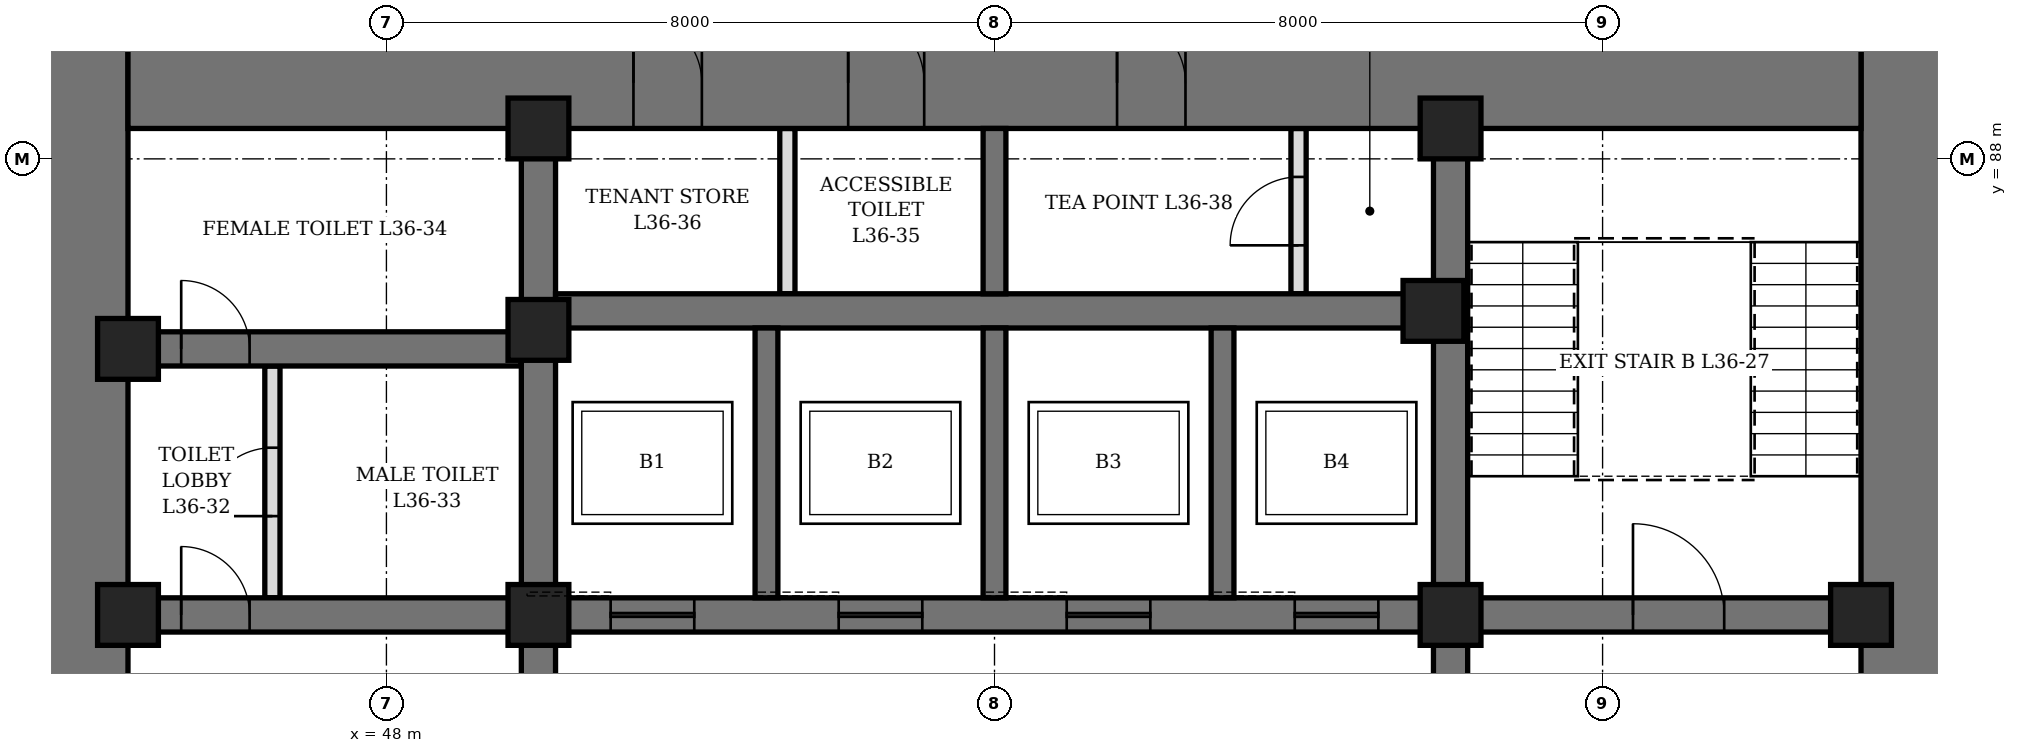
"""IFC4 building model, lengths in metres.
Left out: names, types, materials, properties, quantities, classifications, styles, units other than length and angle.
Written with IfcOpenShell. Run it as: python <this file> out.ifc"""

import sys

from ifc_helpers import new_model, si_unit, direction, frame, frame_2d, origin, origin_2d, place, context, subcontext, project, spatial, rectangle, hollow_rectangle, extrude, element, fill, save


model = new_model("IFC4")
c1 = context("Model", 3, precision=1e-05, world=origin(), true_north=direction((0.0, 1.0)))
c2 = subcontext(c1, "Body", "Model", "MODEL_VIEW")
j1 = project(units=[si_unit("LENGTHUNIT", "METRE"), si_unit("PLANEANGLEUNIT", "RADIAN")], contexts=[c1])
p1 = place(None, origin())
s1 = spatial("IfcSite", under=j1, at=p1, CompositionType="ELEMENT")
p2 = place(p1, origin())
s2 = spatial("IfcBuilding", under=s1, at=p2, CompositionType="ELEMENT")
p3 = place(p2, frame((0.0, 0.0, 162.7)))
s3 = spatial("IfcBuildingStorey", under=s2, at=p3, CompositionType="ELEMENT", Elevation=162.7)
p4 = place(p3, frame((44.0, 70.4, 0.0), z_axis=(0.0, 0.0, 1.0), x_axis=(0.0, 1.0, 0.0)))
e1 = element("IfcWall", 1, at=p4, inside=s3, PredefinedType="SHEAR", context=c2, shape_type="SweptSolid", body=[
    extrude(rectangle(XDim=19.2, YDim=1.2, at=frame_2d((9.6, 0.0))), origin(), (0.0, 0.0, 1.0), 4.2),
])
p5 = place(p4, frame((8.6, 0.0, 0.0)))
e2 = element("IfcOpeningElement", 2, at=p5, cuts=e1, PredefinedType="OPENING", context=c2, shape_type="SweptSolid", body=[
    extrude(rectangle(XDim=2.0, YDim=2.4, at=frame_2d((1.0, 1.2))), frame((0.0, 0.61, 0.0), z_axis=(0.0, -1.0, 0.0), x_axis=(1.0, 0.0, 0.0)), (0.0, 0.0, 1.0), 1.22),
])
p6 = place(p3, frame((68.0, 70.4, 0.0), z_axis=(0.0, 0.0, 1.0), x_axis=(0.0, 1.0, 0.0)))
e3 = element("IfcWall", 3, at=p6, inside=s3, PredefinedType="SHEAR", context=c2, shape_type="SweptSolid", body=[
    extrude(rectangle(XDim=19.2, YDim=1.2, at=frame_2d((9.6, 0.0))), origin(), (0.0, 0.0, 1.0), 4.2),
])
p7 = place(p6, frame((8.6, 0.0, 0.0)))
e4 = element("IfcOpeningElement", 4, at=p7, cuts=e3, PredefinedType="OPENING", context=c2, shape_type="SweptSolid", body=[
    extrude(rectangle(XDim=2.0, YDim=2.4, at=frame_2d((1.0, 1.2))), frame((0.0, 0.61, 0.0), z_axis=(0.0, -1.0, 0.0), x_axis=(1.0, 0.0, 0.0)), (0.0, 0.0, 1.0), 1.22),
])
p8 = place(p3, frame((44.6, 89.0, 0.0), z_axis=(0.0, 0.0, 1.0), x_axis=(1.0, 0.0, 0.0)))
e5 = element("IfcWall", 5, at=p8, inside=s3, PredefinedType="SHEAR", context=c2, shape_type="SweptSolid", body=[
    extrude(rectangle(XDim=22.8, YDim=1.2, at=frame_2d((11.4, 0.0))), origin(), (0.0, 0.0, 1.0), 4.2),
])
p9 = place(p8, frame((9.475, 0.0, 0.0)))
e6 = element("IfcOpeningElement", 6, at=p9, cuts=e5, PredefinedType="OPENING", context=c2, shape_type="SweptSolid", body=[
    extrude(rectangle(XDim=1.0, YDim=2.1, at=frame_2d((0.5, 1.05))), frame((0.0, 0.61, 0.0), z_axis=(0.0, -1.0, 0.0), x_axis=(1.0, 0.0, 0.0)), (0.0, 0.0, 1.0), 1.22),
])
p10 = place(p8, frame((6.65, 0.0, 0.0)))
e7 = element("IfcOpeningElement", 7, at=p10, cuts=e5, PredefinedType="OPENING", context=c2, shape_type="SweptSolid", body=[
    extrude(rectangle(XDim=0.9, YDim=2.1, at=frame_2d((0.45, 1.05))), frame((0.0, 0.61, 0.0), z_axis=(0.0, -1.0, 0.0), x_axis=(1.0, 0.0, 0.0)), (0.0, 0.0, 1.0), 1.22),
])
p11 = place(p8, frame((13.012, 0.0, 0.0)))
e8 = element("IfcOpeningElement", 8, at=p11, cuts=e5, PredefinedType="OPENING", context=c2, shape_type="SweptSolid", body=[
    extrude(rectangle(XDim=0.9, YDim=2.1, at=frame_2d((0.45, 1.05))), frame((0.0, 0.61, 0.0), z_axis=(0.0, -1.0, 0.0), x_axis=(1.0, 0.0, 0.0)), (0.0, 0.0, 1.0), 1.22),
])
p12 = place(p3, frame((50.0, 71.6, 0.0), z_axis=(0.0, 0.0, 1.0), x_axis=(0.0, 1.0, 0.0)))
e9 = element("IfcWall", 9, at=p12, inside=s3, PredefinedType="SHEAR", context=c2, shape_type="SweptSolid", body=[
    extrude(rectangle(XDim=16.8, YDim=0.45, at=frame_2d((8.4, 0.0))), origin(), (0.0, 0.0, 1.0), 4.2),
])
p13 = place(p12, frame((7.5, 0.0, 0.0)))
e10 = element("IfcOpeningElement", 10, at=p13, cuts=e9, PredefinedType="OPENING", context=c2, shape_type="SweptSolid", body=[
    extrude(rectangle(XDim=1.8, YDim=2.4, at=frame_2d((0.9, 1.2))), frame((0.0, 0.235, 0.0), z_axis=(0.0, -1.0, 0.0), x_axis=(1.0, 0.0, 0.0)), (0.0, 0.0, 1.0), 0.47),
])
p14 = place(p3, frame((62.0, 71.6, 0.0), z_axis=(0.0, 0.0, 1.0), x_axis=(0.0, 1.0, 0.0)))
e11 = element("IfcWall", 11, at=p14, inside=s3, PredefinedType="SHEAR", context=c2, shape_type="SweptSolid", body=[
    extrude(rectangle(XDim=16.8, YDim=0.45, at=frame_2d((8.4, 0.0))), origin(), (0.0, 0.0, 1.0), 4.2),
])
p15 = place(p14, frame((7.5, 0.0, 0.0)))
e12 = element("IfcOpeningElement", 12, at=p15, cuts=e11, PredefinedType="OPENING", context=c2, shape_type="SweptSolid", body=[
    extrude(rectangle(XDim=1.8, YDim=2.4, at=frame_2d((0.9, 1.2))), frame((0.0, 0.235, 0.0), z_axis=(0.0, -1.0, 0.0), x_axis=(1.0, 0.0, 0.0)), (0.0, 0.0, 1.0), 0.47),
])
p16 = place(p3, frame((44.6, 82.0, 0.0), z_axis=(0.0, 0.0, 1.0), x_axis=(1.0, 0.0, 0.0)))
e13 = element("IfcWall", 13, at=p16, inside=s3, PredefinedType="SHEAR", context=c2, shape_type="SweptSolid", body=[
    extrude(rectangle(XDim=5.175, YDim=0.45, at=frame_2d((2.587, 0.0))), origin(), (0.0, 0.0, 1.0), 4.2),
])
p17 = place(p16, frame((0.7, 0.0, 0.0)))
e14 = element("IfcOpeningElement", 14, at=p17, cuts=e13, PredefinedType="OPENING", context=c2, shape_type="SweptSolid", body=[
    extrude(rectangle(XDim=0.9, YDim=2.1, at=frame_2d((0.45, 1.05))), frame((0.0, 0.235, 0.0), z_axis=(0.0, -1.0, 0.0), x_axis=(1.0, 0.0, 0.0)), (0.0, 0.0, 1.0), 0.47),
])
p18 = place(p3, frame((44.6, 85.5, 0.0), z_axis=(0.0, 0.0, 1.0), x_axis=(1.0, 0.0, 0.0)))
e15 = element("IfcWall", 15, at=p18, inside=s3, PredefinedType="SHEAR", context=c2, shape_type="SweptSolid", body=[
    extrude(rectangle(XDim=5.175, YDim=0.45, at=frame_2d((2.587, 0.0))), origin(), (0.0, 0.0, 1.0), 4.2),
])
p19 = place(p18, frame((0.7, 0.0, 0.0)))
e16 = element("IfcOpeningElement", 16, at=p19, cuts=e15, PredefinedType="OPENING", context=c2, shape_type="SweptSolid", body=[
    extrude(rectangle(XDim=0.9, YDim=2.1, at=frame_2d((0.45, 1.05))), frame((0.0, 0.235, 0.0), z_axis=(0.0, -1.0, 0.0), x_axis=(1.0, 0.0, 0.0)), (0.0, 0.0, 1.0), 0.47),
])
p20 = place(p3, frame((62.225, 82.0, 0.0), z_axis=(0.0, 0.0, 1.0), x_axis=(1.0, 0.0, 0.0)))
e17 = element("IfcWall", 17, at=p20, inside=s3, PredefinedType="SHEAR", context=c2, shape_type="SweptSolid", body=[
    extrude(rectangle(XDim=5.175, YDim=0.45, at=frame_2d((2.587, 0.0))), origin(), (0.0, 0.0, 1.0), 4.2),
])
p21 = place(p20, frame((2.175, 0.0, 0.0)))
e18 = element("IfcOpeningElement", 18, at=p21, cuts=e17, PredefinedType="OPENING", context=c2, shape_type="SweptSolid", body=[
    extrude(rectangle(XDim=1.2, YDim=2.1, at=frame_2d((0.6, 1.05))), frame((0.0, 0.235, 0.0), z_axis=(0.0, -1.0, 0.0), x_axis=(1.0, 0.0, 0.0)), (0.0, 0.0, 1.0), 0.47),
])
p22 = place(p3, frame((50.225, 82.0, 0.0), z_axis=(0.0, 0.0, 1.0), x_axis=(1.0, 0.0, 0.0)))
e19 = element("IfcWall", 19, at=p22, inside=s3, PredefinedType="SHEAR", context=c2, shape_type="SweptSolid", body=[
    extrude(rectangle(XDim=11.55, YDim=0.45, at=frame_2d((5.775, 0.0))), origin(), (0.0, 0.0, 1.0), 4.2),
])
p23 = place(p22, frame((0.725, 0.0, 0.0)))
e20 = element("IfcOpeningElement", 20, at=p23, cuts=e19, PredefinedType="OPENING", context=c2, shape_type="SweptSolid", body=[
    extrude(rectangle(XDim=1.1, YDim=2.2, at=frame_2d((0.55, 1.1))), frame((0.0, 0.235, 0.0), z_axis=(0.0, -1.0, 0.0), x_axis=(1.0, 0.0, 0.0)), (0.0, 0.0, 1.0), 0.47),
])
p24 = place(p22, frame((3.725, 0.0, 0.0)))
e21 = element("IfcOpeningElement", 21, at=p24, cuts=e19, PredefinedType="OPENING", context=c2, shape_type="SweptSolid", body=[
    extrude(rectangle(XDim=1.1, YDim=2.2, at=frame_2d((0.55, 1.1))), frame((0.0, 0.235, 0.0), z_axis=(0.0, -1.0, 0.0), x_axis=(1.0, 0.0, 0.0)), (0.0, 0.0, 1.0), 0.47),
])
p25 = place(p22, frame((6.725, 0.0, 0.0)))
e22 = element("IfcOpeningElement", 22, at=p25, cuts=e19, PredefinedType="OPENING", context=c2, shape_type="SweptSolid", body=[
    extrude(rectangle(XDim=1.1, YDim=2.2, at=frame_2d((0.55, 1.1))), frame((0.0, 0.235, 0.0), z_axis=(0.0, -1.0, 0.0), x_axis=(1.0, 0.0, 0.0)), (0.0, 0.0, 1.0), 0.47),
])
p26 = place(p22, frame((9.725, 0.0, 0.0)))
e23 = element("IfcOpeningElement", 23, at=p26, cuts=e19, PredefinedType="OPENING", context=c2, shape_type="SweptSolid", body=[
    extrude(rectangle(XDim=1.1, YDim=2.2, at=frame_2d((0.55, 1.1))), frame((0.0, 0.235, 0.0), z_axis=(0.0, -1.0, 0.0), x_axis=(1.0, 0.0, 0.0)), (0.0, 0.0, 1.0), 0.47),
])
p27 = place(p3, frame((50.225, 86.0, 0.0), z_axis=(0.0, 0.0, 1.0), x_axis=(1.0, 0.0, 0.0)))
e24 = element("IfcWall", 24, at=p27, inside=s3, PredefinedType="SHEAR", context=c2, shape_type="SweptSolid", body=[
    extrude(rectangle(XDim=11.55, YDim=0.45, at=frame_2d((5.775, 0.0))), origin(), (0.0, 0.0, 1.0), 4.2),
])
for number, where, z_axis, x_axis in (
    (25, (53.0, 82.225, 0.0), (0.0, 0.0, 1.0), (0.0, 1.0, 0.0)),
    (26, (56.0, 82.225, 0.0), (0.0, 0.0, 1.0), (0.0, 1.0, 0.0)),
    (27, (59.0, 82.225, 0.0), (0.0, 0.0, 1.0), (0.0, 1.0, 0.0)),
):
    element("IfcWall", number, at=place(p3, frame(where, z_axis=z_axis, x_axis=x_axis)), inside=s3, PredefinedType="SHEAR", context=c2, shape_type="SweptSolid", body=[
        extrude(rectangle(XDim=3.55, YDim=0.3, at=frame_2d((1.775, 0.0))), origin(), (0.0, 0.0, 1.0), 4.2),
    ])
p28 = place(p3, frame((56.0, 86.225, 0.0), z_axis=(0.0, 0.0, 1.0), x_axis=(0.0, 1.0, 0.0)))
e28 = element("IfcWall", 28, at=p28, inside=s3, PredefinedType="SHEAR", context=c2, shape_type="SweptSolid", body=[
    extrude(rectangle(XDim=2.175, YDim=0.3, at=frame_2d((1.087, 0.0))), origin(), (0.0, 0.0, 1.0), 4.2),
])
for number, where, z_axis, x_axis in (
    (29, (44.6, 82.0, 0.0), (0.0, 0.0, 1.0), (1.0, 0.0, 0.0)),
    (30, (44.6, 85.5, 0.0), (0.0, 0.0, 1.0), (1.0, 0.0, 0.0)),
    (31, (50.0, 82.0, 0.0), (0.0, 0.0, 1.0), (1.0, 0.0, 0.0)),
    (32, (50.0, 85.75, 0.0), (0.0, 0.0, 1.0), (1.0, 0.0, 0.0)),
    (33, (50.0, 88.4, 0.0), (0.0, 0.0, 1.0), (1.0, 0.0, 0.0)),
    (34, (61.775, 86.0, 0.0), (0.0, 0.0, 1.0), (1.0, 0.0, 0.0)),
    (35, (62.0, 82.0, 0.0), (0.0, 0.0, 1.0), (1.0, 0.0, 0.0)),
    (36, (62.0, 88.4, 0.0), (0.0, 0.0, 1.0), (1.0, 0.0, 0.0)),
    (37, (67.4, 82.0, 0.0), (0.0, 0.0, 1.0), (1.0, 0.0, 0.0)),
):
    element("IfcColumn", number, at=place(p3, frame(where, z_axis=z_axis, x_axis=x_axis)), inside=s3, PredefinedType="COLUMN", context=c2, shape_type="SweptSolid", body=[
        extrude(hollow_rectangle(XDim=0.8, YDim=0.8, WallThickness=0.1, at=origin_2d()), origin(), (0.0, 0.0, 1.0), 4.2),
    ])
p29 = place(p3, frame((46.5, 82.225, 0.0), z_axis=(0.0, 0.0, 1.0), x_axis=(0.0, 1.0, 0.0)))
e38 = element("IfcWall", 38, at=p29, inside=s3, PredefinedType="PARTITIONING", context=c2, shape_type="SweptSolid", body=[
    extrude(rectangle(XDim=3.05, YDim=0.2, at=frame_2d((1.525, 0.0))), origin(), (0.0, 0.0, 1.0), 4.04),
])
p30 = place(p29, frame((1.075, 0.0, 0.0)))
e39 = element("IfcOpeningElement", 39, at=p30, cuts=e38, PredefinedType="OPENING", context=c2, shape_type="SweptSolid", body=[
    extrude(rectangle(XDim=0.9, YDim=2.1, at=frame_2d((0.45, 1.05))), frame((0.0, 0.11, 0.0), z_axis=(0.0, -1.0, 0.0), x_axis=(1.0, 0.0, 0.0)), (0.0, 0.0, 1.0), 0.22),
])
p31 = place(p3, frame((53.275, 86.225, 0.0), z_axis=(0.0, 0.0, 1.0), x_axis=(0.0, 1.0, 0.0)))
e40 = element("IfcWall", 40, at=p31, inside=s3, PredefinedType="PARTITIONING", context=c2, shape_type="SweptSolid", body=[
    extrude(rectangle(XDim=2.175, YDim=0.2, at=frame_2d((1.087, 0.0))), origin(), (0.0, 0.0, 1.0), 4.04),
])
p32 = place(p3, frame((60.0, 86.225, 0.0), z_axis=(0.0, 0.0, 1.0), x_axis=(0.0, 1.0, 0.0)))
e41 = element("IfcWall", 41, at=p32, inside=s3, PredefinedType="PARTITIONING", context=c2, shape_type="SweptSolid", body=[
    extrude(rectangle(XDim=2.175, YDim=0.2, at=frame_2d((1.087, 0.0))), origin(), (0.0, 0.0, 1.0), 4.04),
])
p33 = place(p32, frame((0.637, 0.0, 0.0)))
e42 = element("IfcOpeningElement", 42, at=p33, cuts=e41, PredefinedType="OPENING", context=c2, shape_type="SweptSolid", body=[
    extrude(rectangle(XDim=0.9, YDim=2.1, at=frame_2d((0.45, 1.05))), frame((0.0, 0.11, 0.0), z_axis=(0.0, -1.0, 0.0), x_axis=(1.0, 0.0, 0.0)), (0.0, 0.0, 1.0), 0.22),
])
p34 = place(p17, origin())
e43 = element("IfcDoor", 43, at=p34, inside=s3, OperationType="SINGLE_SWING_LEFT", PredefinedType="DOOR", context=c2, shape_type="SweptSolid", body=[
    extrude(rectangle(XDim=0.9, YDim=2.1, at=frame_2d((0.45, 1.05))), frame((0.0, 0.225, 0.0), z_axis=(0.0, -1.0, 0.0), x_axis=(1.0, 0.0, 0.0)), (0.0, 0.0, 1.0), 0.449),
])
fill(e14, e43)
p35 = place(p30, origin())
e44 = element("IfcDoor", 44, at=p35, inside=s3, OperationType="SINGLE_SWING_RIGHT", PredefinedType="DOOR", context=c2, shape_type="SweptSolid", body=[
    extrude(rectangle(XDim=0.9, YDim=2.1, at=frame_2d((0.45, 1.05))), frame((0.0, 0.1, 0.0), z_axis=(0.0, -1.0, 0.0), x_axis=(1.0, 0.0, 0.0)), (0.0, 0.0, 1.0), 0.199),
])
fill(e39, e44)
p36 = place(p19, origin())
e45 = element("IfcDoor", 45, at=p36, inside=s3, OperationType="SINGLE_SWING_RIGHT", PredefinedType="DOOR", context=c2, shape_type="SweptSolid", body=[
    extrude(rectangle(XDim=0.9, YDim=2.1, at=frame_2d((0.45, 1.05))), frame((0.0, 0.225, 0.0), z_axis=(0.0, -1.0, 0.0), x_axis=(1.0, 0.0, 0.0)), (0.0, 0.0, 1.0), 0.449),
])
fill(e16, e45)
p37 = place(p9, origin())
e46 = element("IfcDoor", 46, at=p37, inside=s3, OperationType="SINGLE_SWING_LEFT", PredefinedType="DOOR", context=c2, shape_type="SweptSolid", body=[
    extrude(rectangle(XDim=1.0, YDim=2.1, at=frame_2d((0.5, 1.05))), frame((0.0, 0.35, 0.0), z_axis=(0.0, -1.0, 0.0), x_axis=(1.0, 0.0, 0.0)), (0.0, 0.0, 1.0), 0.7),
])
fill(e6, e46)
p38 = place(p10, origin())
e47 = element("IfcDoor", 47, at=p38, inside=s3, OperationType="SINGLE_SWING_LEFT", PredefinedType="DOOR", context=c2, shape_type="SweptSolid", body=[
    extrude(rectangle(XDim=0.9, YDim=2.1, at=frame_2d((0.45, 1.05))), frame((0.0, 0.35, 0.0), z_axis=(0.0, -1.0, 0.0), x_axis=(1.0, 0.0, 0.0)), (0.0, 0.0, 1.0), 0.7),
])
fill(e7, e47)
p39 = place(p11, origin())
e48 = element("IfcDoor", 48, at=p39, inside=s3, OperationType="SINGLE_SWING_LEFT", PredefinedType="DOOR", context=c2, shape_type="SweptSolid", body=[
    extrude(rectangle(XDim=0.9, YDim=2.1, at=frame_2d((0.45, 1.05))), frame((0.0, 0.35, 0.0), z_axis=(0.0, -1.0, 0.0), x_axis=(1.0, 0.0, 0.0)), (0.0, 0.0, 1.0), 0.7),
])
fill(e8, e48)
p40 = place(p33, origin())
e49 = element("IfcDoor", 49, at=p40, inside=s3, OperationType="SINGLE_SWING_LEFT", PredefinedType="DOOR", context=c2, shape_type="SweptSolid", body=[
    extrude(rectangle(XDim=0.9, YDim=2.1, at=frame_2d((0.45, 1.05))), frame((0.0, 0.1, 0.0), z_axis=(0.0, -1.0, 0.0), x_axis=(1.0, 0.0, 0.0)), (0.0, 0.0, 1.0), 0.199),
])
fill(e42, e49)
p41 = place(p21, origin())
e50 = element("IfcDoor", 50, at=p41, inside=s3, OperationType="SINGLE_SWING_LEFT", PredefinedType="DOOR", context=c2, shape_type="SweptSolid", body=[
    extrude(rectangle(XDim=1.2, YDim=2.1, at=frame_2d((0.6, 1.05))), frame((0.0, 0.225, 0.0), z_axis=(0.0, -1.0, 0.0), x_axis=(1.0, 0.0, 0.0)), (0.0, 0.0, 1.0), 0.449),
])
fill(e18, e50)
p42 = place(p23, origin())
e51 = element("IfcDoor", 51, at=p42, inside=s3, OperationType="SLIDING_TO_LEFT", PredefinedType="DOOR", context=c2, shape_type="SweptSolid", body=[
    extrude(rectangle(XDim=1.1, YDim=2.2, at=frame_2d((0.55, 1.1))), frame((0.0, 0.225, 0.0), z_axis=(0.0, -1.0, 0.0), x_axis=(1.0, 0.0, 0.0)), (0.0, 0.0, 1.0), 0.449),
])
fill(e20, e51)
p43 = place(p24, origin())
e52 = element("IfcDoor", 52, at=p43, inside=s3, OperationType="SLIDING_TO_LEFT", PredefinedType="DOOR", context=c2, shape_type="SweptSolid", body=[
    extrude(rectangle(XDim=1.1, YDim=2.2, at=frame_2d((0.55, 1.1))), frame((0.0, 0.225, 0.0), z_axis=(0.0, -1.0, 0.0), x_axis=(1.0, 0.0, 0.0)), (0.0, 0.0, 1.0), 0.449),
])
fill(e21, e52)
p44 = place(p25, origin())
e53 = element("IfcDoor", 53, at=p44, inside=s3, OperationType="SLIDING_TO_LEFT", PredefinedType="DOOR", context=c2, shape_type="SweptSolid", body=[
    extrude(rectangle(XDim=1.1, YDim=2.2, at=frame_2d((0.55, 1.1))), frame((0.0, 0.225, 0.0), z_axis=(0.0, -1.0, 0.0), x_axis=(1.0, 0.0, 0.0)), (0.0, 0.0, 1.0), 0.449),
])
fill(e22, e53)
p45 = place(p26, origin())
e54 = element("IfcDoor", 54, at=p45, inside=s3, OperationType="SLIDING_TO_LEFT", PredefinedType="DOOR", context=c2, shape_type="SweptSolid", body=[
    extrude(rectangle(XDim=1.1, YDim=2.2, at=frame_2d((0.55, 1.1))), frame((0.0, 0.225, 0.0), z_axis=(0.0, -1.0, 0.0), x_axis=(1.0, 0.0, 0.0)), (0.0, 0.0, 1.0), 0.449),
])
fill(e23, e54)
save(model, sys.argv[1])
